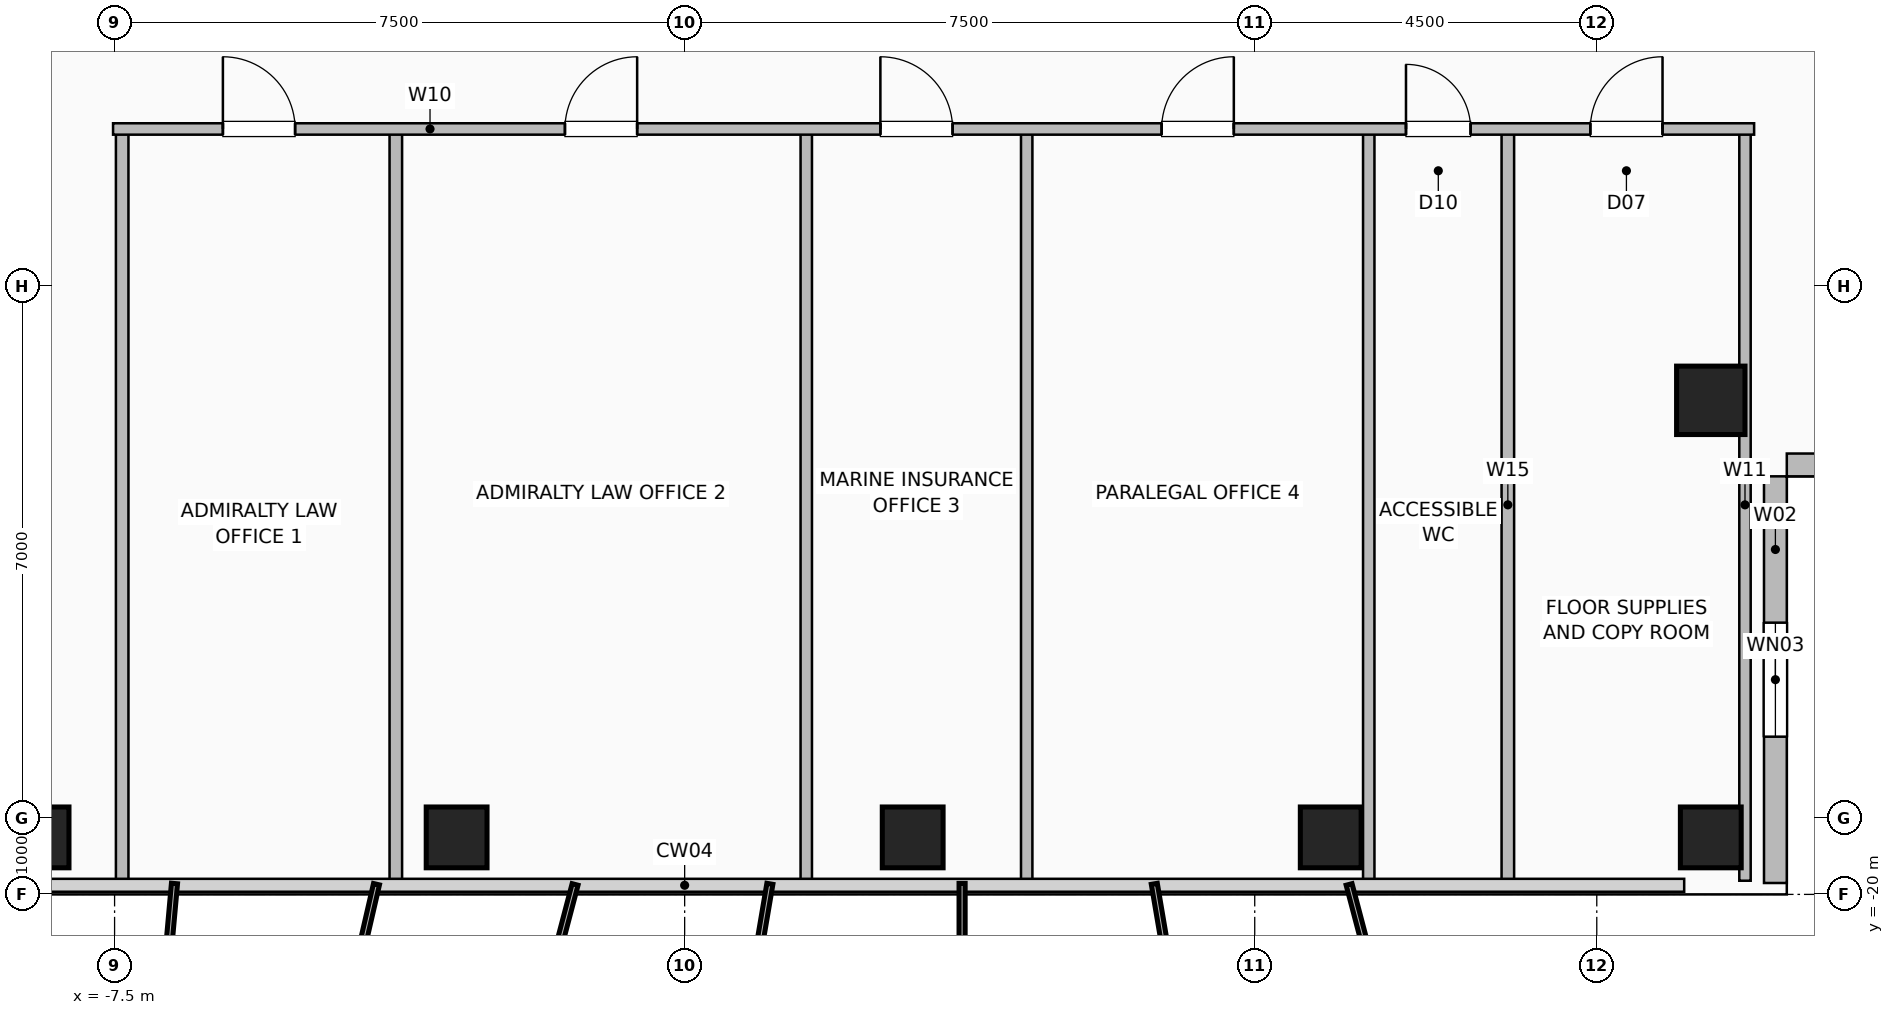
"""IFC4 building model, lengths in metres.
Left out: names, types, materials, properties, quantities, classifications, styles, units other than length and angle.
Written with IfcOpenShell. Run it as: python <this file> out.ifc"""

import sys

from ifc_helpers import new_model, si_unit, direction, frame, frame_2d, origin, origin_2d, place, context, subcontext, project, spatial, rectangle, hollow_rectangle, extrude, element, fill, save


model = new_model("IFC4")
c1 = context("Model", 3, precision=1e-05, world=origin(), true_north=direction((0.0, 1.0)))
c2 = subcontext(c1, "Body", "Model", "MODEL_VIEW")
j1 = project(units=[si_unit("LENGTHUNIT", "METRE"), si_unit("PLANEANGLEUNIT", "RADIAN")], contexts=[c1])
p1 = place(None, origin())
s1 = spatial("IfcSite", under=j1, at=p1, CompositionType="ELEMENT")
p2 = place(p1, origin())
s2 = spatial("IfcBuilding", under=s1, at=p2, CompositionType="ELEMENT")
p3 = place(p2, frame((0.0, 0.0, 173.4)))
s3 = spatial("IfcBuildingStorey", under=s2, at=p3, CompositionType="ELEMENT", Elevation=173.4)
for number, where, z_axis, x_axis in (
    (1, (-8.5, -19.25, 0.0), (0.0, 0.0, 1.0), (1.0, 0.0, 0.0)),
    (2, (-3.0, -19.25, 0.0), (0.0, 0.0, 1.0), (1.0, 0.0, 0.0)),
    (3, (3.0, -19.25, 0.0), (0.0, 0.0, 1.0), (1.0, 0.0, 0.0)),
    (4, (8.5, -19.25, 0.0), (0.0, 0.0, 1.0), (1.0, 0.0, 0.0)),
    (5, (13.5, -19.25, 0.0), (0.0, 0.0, 1.0), (1.0, 0.0, 0.0)),
):
    element("IfcColumn", number, at=place(p3, frame(where, z_axis=z_axis, x_axis=x_axis)), inside=s3, PredefinedType="COLUMN", context=c2, shape_type="SweptSolid", body=[
        extrude(hollow_rectangle(XDim=0.8, YDim=0.8, WallThickness=0.04, at=origin_2d()), origin(), (0.0, 0.0, 1.0), 3.6),
    ])
p4 = place(p3, frame((13.5, -13.5, 0.0), z_axis=(0.0, 0.0, 1.0), x_axis=(1.0, 0.0, 0.0)))
e6 = element("IfcColumn", 6, at=p4, inside=s3, PredefinedType="COLUMN", context=c2, shape_type="SweptSolid", body=[
    extrude(hollow_rectangle(XDim=0.9, YDim=0.9, WallThickness=0.045, at=origin_2d()), origin(), (0.0, 0.0, 1.0), 3.6),
])
p5 = place(p3, frame((14.35, -19.85, 0.0), z_axis=(0.0, 0.0, 1.0), x_axis=(0.0, 1.0, 0.0)))
e7 = element("IfcWall", 7, at=p5, inside=s3, PredefinedType="SOLIDWALL", context=c2, shape_type="SweptSolid", body=[
    extrude(rectangle(XDim=5.35, YDim=0.3, at=frame_2d((2.675, 0.0))), origin(), (0.0, 0.0, 1.0), 3.36),
])
p6 = place(p5, frame((1.925, 0.0, 0.9)))
e8 = element("IfcOpeningElement", 8, at=p6, cuts=e7, PredefinedType="OPENING", context=c2, shape_type="SweptSolid", body=[
    extrude(rectangle(XDim=1.5, YDim=1.8, at=frame_2d((0.75, 0.9))), frame((0.0, 0.16, 0.0), z_axis=(0.0, -1.0, 0.0), x_axis=(1.0, 0.0, 0.0)), (0.0, 0.0, 1.0), 0.32),
])
p7 = place(p3, frame((19.85, -14.35, 0.0), z_axis=(0.0, 0.0, 1.0), x_axis=(-1.0, 0.0, 0.0)))
e9 = element("IfcWall", 9, at=p7, inside=s3, PredefinedType="SOLIDWALL", context=c2, shape_type="SweptSolid", body=[
    extrude(rectangle(XDim=5.35, YDim=0.3, at=frame_2d((2.675, 0.0))), origin(), (0.0, 0.0, 1.0), 3.36),
])
for number, where, z_axis, x_axis in (
    (10, (10.83, -19.82, 0.0), (0.0, 0.0, 1.0), (0.0, 1.0, 0.0)),
    (11, (-7.4, -19.82, 0.0), (0.0, 0.0, 1.0), (0.0, 1.0, 0.0)),
    (12, (-3.8, -19.82, 0.0), (0.0, 0.0, 1.0), (0.0, 1.0, 0.0)),
):
    element("IfcWall", number, at=place(p3, frame(where, z_axis=z_axis, x_axis=x_axis)), inside=s3, PredefinedType="PLUMBINGWALL", context=c2, shape_type="SweptSolid", body=[
        extrude(rectangle(XDim=9.89, YDim=0.165, at=frame_2d((4.945, 0.0))), origin(), (0.0, 0.0, 1.0), 3.36),
    ])
for number, where, z_axis, x_axis in (
    (13, (1.6, -19.82, 0.0), (0.0, 0.0, 1.0), (0.0, 1.0, 0.0)),
    (14, (4.5, -19.82, 0.0), (0.0, 0.0, 1.0), (0.0, 1.0, 0.0)),
    (15, (9.0, -19.82, 0.0), (0.0, 0.0, 1.0), (0.0, 1.0, 0.0)),
    (16, (13.95, -19.82, 0.0), (0.0, 0.0, 1.0), (0.0, 1.0, 0.0)),
):
    element("IfcWall", number, at=place(p3, frame(where, z_axis=z_axis, x_axis=x_axis)), inside=s3, PredefinedType="PARTITIONING", context=c2, shape_type="SweptSolid", body=[
        extrude(rectangle(XDim=9.89, YDim=0.15, at=frame_2d((4.945, 0.0))), origin(), (0.0, 0.0, 1.0), 3.36),
    ])
p8 = place(p3, frame((-7.52, -9.93, 0.0), z_axis=(0.0, 0.0, 1.0), x_axis=(1.0, 0.0, 0.0)))
e17 = element("IfcWall", 17, at=p8, inside=s3, PredefinedType="PARTITIONING", context=c2, shape_type="SweptSolid", body=[
    extrude(rectangle(XDim=21.59, YDim=0.15, at=frame_2d((10.795, 0.0))), origin(), (0.0, 0.0, 1.0), 3.36),
])
p9 = place(p8, frame((1.445, 0.0, 0.0)))
e18 = element("IfcOpeningElement", 18, at=p9, cuts=e17, PredefinedType="OPENING", context=c2, shape_type="SweptSolid", body=[
    extrude(rectangle(XDim=0.95, YDim=2.06, at=frame_2d((0.475, 1.03))), frame((0.0, 0.085, 0.0), z_axis=(0.0, -1.0, 0.0), x_axis=(1.0, 0.0, 0.0)), (0.0, 0.0, 1.0), 0.17),
])
p10 = place(p8, frame((5.945, 0.0, 0.0)))
e19 = element("IfcOpeningElement", 19, at=p10, cuts=e17, PredefinedType="OPENING", context=c2, shape_type="SweptSolid", body=[
    extrude(rectangle(XDim=0.95, YDim=2.06, at=frame_2d((0.475, 1.03))), frame((0.0, 0.085, 0.0), z_axis=(0.0, -1.0, 0.0), x_axis=(1.0, 0.0, 0.0)), (0.0, 0.0, 1.0), 0.17),
])
p11 = place(p8, frame((10.095, 0.0, 0.0)))
e20 = element("IfcOpeningElement", 20, at=p11, cuts=e17, PredefinedType="OPENING", context=c2, shape_type="SweptSolid", body=[
    extrude(rectangle(XDim=0.95, YDim=2.06, at=frame_2d((0.475, 1.03))), frame((0.0, 0.085, 0.0), z_axis=(0.0, -1.0, 0.0), x_axis=(1.0, 0.0, 0.0)), (0.0, 0.0, 1.0), 0.17),
])
p12 = place(p8, frame((13.795, 0.0, 0.0)))
e21 = element("IfcOpeningElement", 21, at=p12, cuts=e17, PredefinedType="OPENING", context=c2, shape_type="SweptSolid", body=[
    extrude(rectangle(XDim=0.95, YDim=2.06, at=frame_2d((0.475, 1.03))), frame((0.0, 0.085, 0.0), z_axis=(0.0, -1.0, 0.0), x_axis=(1.0, 0.0, 0.0)), (0.0, 0.0, 1.0), 0.17),
])
p13 = place(p8, frame((17.01, 0.0, 0.0)))
e22 = element("IfcOpeningElement", 22, at=p13, cuts=e17, PredefinedType="OPENING", context=c2, shape_type="SweptSolid", body=[
    extrude(rectangle(XDim=0.85, YDim=2.05, at=frame_2d((0.425, 1.025))), frame((0.0, 0.085, 0.0), z_axis=(0.0, -1.0, 0.0), x_axis=(1.0, 0.0, 0.0)), (0.0, 0.0, 1.0), 0.17),
])
p14 = place(p8, frame((19.435, 0.0, 0.0)))
e23 = element("IfcOpeningElement", 23, at=p14, cuts=e17, PredefinedType="OPENING", context=c2, shape_type="SweptSolid", body=[
    extrude(rectangle(XDim=0.95, YDim=2.06, at=frame_2d((0.475, 1.03))), frame((0.0, 0.085, 0.0), z_axis=(0.0, -1.0, 0.0), x_axis=(1.0, 0.0, 0.0)), (0.0, 0.0, 1.0), 0.17),
])
p15 = place(p6, origin())
e24 = element("IfcWindow", 24, at=p15, inside=s3, PartitioningType="SINGLE_PANEL", PredefinedType="WINDOW", context=c2, shape_type="SweptSolid", body=[
    extrude(rectangle(XDim=1.5, YDim=1.8, at=frame_2d((0.75, 0.9))), frame((0.0, 0.03, 0.0), z_axis=(0.0, -1.0, 0.0), x_axis=(1.0, 0.0, 0.0)), (0.0, 0.0, 1.0), 0.06),
])
fill(e8, e24)
p16 = place(p9, origin())
e25 = element("IfcDoor", 25, at=p16, inside=s3, OperationType="SINGLE_SWING_LEFT", PredefinedType="DOOR", context=c2, shape_type="SweptSolid", body=[
    extrude(rectangle(XDim=0.95, YDim=2.06, at=frame_2d((0.475, 1.03))), frame((0.0, 0.025, 0.0), z_axis=(0.0, -1.0, 0.0), x_axis=(1.0, 0.0, 0.0)), (0.0, 0.0, 1.0), 0.05),
])
fill(e18, e25)
p17 = place(p10, origin())
e26 = element("IfcDoor", 26, at=p17, inside=s3, OperationType="SINGLE_SWING_RIGHT", PredefinedType="DOOR", context=c2, shape_type="SweptSolid", body=[
    extrude(rectangle(XDim=0.95, YDim=2.06, at=frame_2d((0.475, 1.03))), frame((0.0, 0.025, 0.0), z_axis=(0.0, -1.0, 0.0), x_axis=(1.0, 0.0, 0.0)), (0.0, 0.0, 1.0), 0.05),
])
fill(e19, e26)
p18 = place(p11, origin())
e27 = element("IfcDoor", 27, at=p18, inside=s3, OperationType="SINGLE_SWING_LEFT", PredefinedType="DOOR", context=c2, shape_type="SweptSolid", body=[
    extrude(rectangle(XDim=0.95, YDim=2.06, at=frame_2d((0.475, 1.03))), frame((0.0, 0.025, 0.0), z_axis=(0.0, -1.0, 0.0), x_axis=(1.0, 0.0, 0.0)), (0.0, 0.0, 1.0), 0.05),
])
fill(e20, e27)
p19 = place(p12, origin())
e28 = element("IfcDoor", 28, at=p19, inside=s3, OperationType="SINGLE_SWING_RIGHT", PredefinedType="DOOR", context=c2, shape_type="SweptSolid", body=[
    extrude(rectangle(XDim=0.95, YDim=2.06, at=frame_2d((0.475, 1.03))), frame((0.0, 0.025, 0.0), z_axis=(0.0, -1.0, 0.0), x_axis=(1.0, 0.0, 0.0)), (0.0, 0.0, 1.0), 0.05),
])
fill(e21, e28)
p20 = place(p13, origin())
e29 = element("IfcDoor", 29, at=p20, inside=s3, OperationType="SINGLE_SWING_LEFT", PredefinedType="DOOR", context=c2, shape_type="SweptSolid", body=[
    extrude(rectangle(XDim=0.85, YDim=2.05, at=frame_2d((0.425, 1.025))), frame((0.0, 0.025, 0.0), z_axis=(0.0, -1.0, 0.0), x_axis=(1.0, 0.0, 0.0)), (0.0, 0.0, 1.0), 0.05),
])
fill(e22, e29)
p21 = place(p14, origin())
e30 = element("IfcDoor", 30, at=p21, inside=s3, OperationType="SINGLE_SWING_RIGHT", PredefinedType="DOOR", context=c2, shape_type="SweptSolid", body=[
    extrude(rectangle(XDim=0.95, YDim=2.06, at=frame_2d((0.475, 1.03))), frame((0.0, 0.025, 0.0), z_axis=(0.0, -1.0, 0.0), x_axis=(1.0, 0.0, 0.0)), (0.0, 0.0, 1.0), 0.05),
])
fill(e23, e30)
save(model, sys.argv[1])
